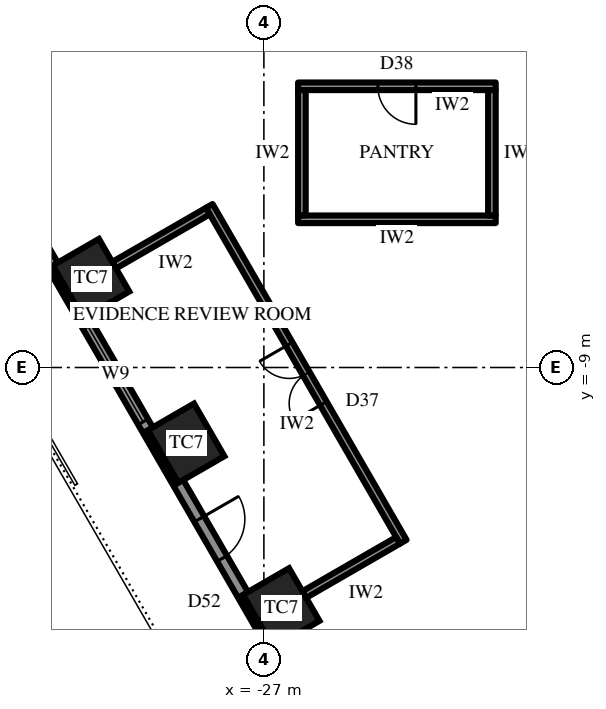
"""IFC4 building model, lengths in metres.
Left out: names, types, materials, properties, quantities, classifications, styles, units other than length and angle.
Written with IfcOpenShell. Run it as: python <this file> out.ifc"""

import sys

from ifc_helpers import new_model, si_unit, direction, frame, frame_2d, origin, origin_2d, place, context, subcontext, project, spatial, rectangle, extrude, element, fill, save


model = new_model("IFC4")
c1 = context("Model", 3, precision=1e-05, world=origin(), true_north=direction((0.0, 1.0)))
c2 = subcontext(c1, "Body", "Model", "MODEL_VIEW")
j1 = project(units=[si_unit("LENGTHUNIT", "METRE"), si_unit("PLANEANGLEUNIT", "RADIAN")], contexts=[c1])
p1 = place(None, origin())
s1 = spatial("IfcSite", under=j1, at=p1, CompositionType="ELEMENT")
p2 = place(p1, origin())
s2 = spatial("IfcBuilding", under=s1, at=p2, CompositionType="ELEMENT")
p3 = place(p2, frame((0.0, 0.0, 165.7)))
s3 = spatial("IfcBuildingStorey", under=s2, at=p3, CompositionType="ELEMENT", Elevation=165.7)
for number, where, z_axis, x_axis in (
    (1, (-31.547, -6.658, 0.0), (0.0, 0.0, 1.0), (0.5, -0.866, 0.0)),
    (2, (-29.045, -10.992, 0.0), (0.0, 0.0, 1.0), (0.5, -0.866, 0.0)),
    (3, (-26.544, -15.325, 0.0), (0.0, 0.0, 1.0), (0.5, -0.866, 0.0)),
):
    element("IfcColumn", number, at=place(p3, frame(where, z_axis=z_axis, x_axis=x_axis)), inside=s3, PredefinedType="COLUMN", context=c2, shape_type="SweptSolid", body=[
        extrude(rectangle(XDim=1.6, YDim=1.4, at=origin_2d()), origin(), (0.0, 0.0, 1.0), 4.2),
    ])
p4 = place(p3, frame((-34.656, -2.675, 0.0), z_axis=(0.0, 0.0, 1.0), x_axis=(0.500003084452, -0.866023622968, 0.0)))
e4 = element("IfcWall", 4, at=p4, inside=s3, PredefinedType="SOLIDWALL", context=c2, shape_type="SweptSolid", body=[
    extrude(rectangle(XDim=30.022, YDim=0.3, at=frame_2d((15.011, 0.0))), origin(), (0.0, 0.0, 1.0), 2.75),
])
p5 = place(p4, frame((1.052, 0.0, 0.6)))
e5 = element("IfcOpeningElement", 5, at=p5, cuts=e4, PredefinedType="OPENING", context=c2, shape_type="SweptSolid", body=[
    extrude(rectangle(XDim=2.9, YDim=1.9, at=frame_2d((1.45, 0.95))), frame((0.0, 0.16, 0.0), z_axis=(0.0, -1.0, 0.0), x_axis=(1.0, 0.0, 0.0)), (0.0, 0.0, 1.0), 0.32),
])
p6 = place(p4, frame((6.056, 0.0, 0.6)))
e6 = element("IfcOpeningElement", 6, at=p6, cuts=e4, PredefinedType="OPENING", context=c2, shape_type="SweptSolid", body=[
    extrude(rectangle(XDim=2.9, YDim=1.9, at=frame_2d((1.45, 0.95))), frame((0.0, 0.16, 0.0), z_axis=(0.0, -1.0, 0.0), x_axis=(1.0, 0.0, 0.0)), (0.0, 0.0, 1.0), 0.32),
])
p7 = place(p4, frame((11.909, 0.0, 0.0)))
e7 = element("IfcOpeningElement", 7, at=p7, cuts=e4, PredefinedType="OPENING", context=c2, shape_type="SweptSolid", body=[
    extrude(rectangle(XDim=1.2, YDim=2.4, at=frame_2d((0.6, 1.2))), frame((0.0, 0.16, 0.0), z_axis=(0.0, -1.0, 0.0), x_axis=(1.0, 0.0, 0.0)), (0.0, 0.0, 1.0), 0.32),
])
p8 = place(p4, frame((16.063, 0.0, 0.6)))
e8 = element("IfcOpeningElement", 8, at=p8, cuts=e4, PredefinedType="OPENING", context=c2, shape_type="SweptSolid", body=[
    extrude(rectangle(XDim=2.9, YDim=1.9, at=frame_2d((1.45, 0.95))), frame((0.0, 0.16, 0.0), z_axis=(0.0, -1.0, 0.0), x_axis=(1.0, 0.0, 0.0)), (0.0, 0.0, 1.0), 0.32),
])
p9 = place(p4, frame((21.067, 0.0, 0.6)))
e9 = element("IfcOpeningElement", 9, at=p9, cuts=e4, PredefinedType="OPENING", context=c2, shape_type="SweptSolid", body=[
    extrude(rectangle(XDim=2.9, YDim=1.9, at=frame_2d((1.45, 0.95))), frame((0.0, 0.16, 0.0), z_axis=(0.0, -1.0, 0.0), x_axis=(1.0, 0.0, 0.0)), (0.0, 0.0, 1.0), 0.32),
])
p10 = place(p4, frame((26.07, 0.0, 0.6)))
e10 = element("IfcOpeningElement", 10, at=p10, cuts=e4, PredefinedType="OPENING", context=c2, shape_type="SweptSolid", body=[
    extrude(rectangle(XDim=2.9, YDim=1.9, at=frame_2d((1.45, 0.95))), frame((0.0, 0.16, 0.0), z_axis=(0.0, -1.0, 0.0), x_axis=(1.0, 0.0, 0.0)), (0.0, 0.0, 1.0), 0.32),
])
p11 = place(p3, frame((-28.436, -4.747, 0.0), z_axis=(0.0, 0.0, 1.0), x_axis=(0.499987468925, -0.866032638483, 0.0)))
e11 = element("IfcWall", 11, at=p11, inside=s3, PredefinedType="PARTITIONING", context=c2, shape_type="SweptSolid", body=[
    extrude(rectangle(XDim=10.207, YDim=0.2, at=frame_2d((5.104, 0.0))), origin(), (0.0, 0.0, 1.0), 4.0),
])
p12 = place(p11, frame((4.204, 0.0, 0.0)))
e12 = element("IfcOpeningElement", 12, at=p12, cuts=e11, PredefinedType="OPENING", context=c2, shape_type="SweptSolid", body=[
    extrude(rectangle(XDim=1.8, YDim=2.4, at=frame_2d((0.9, 1.2))), frame((0.0, 0.11, 0.0), z_axis=(0.0, -1.0, 0.0), x_axis=(1.0, 0.0, 0.0)), (0.0, 0.0, 1.0), 0.22),
])
p13 = place(p3, frame((-28.473, -4.883, 0.0), z_axis=(0.0, 0.0, 1.0), x_axis=(-0.866025820012, -0.499999279071, 0.0)))
e13 = element("IfcWall", 13, at=p13, inside=s3, PredefinedType="PARTITIONING", context=c2, shape_type="SweptSolid", body=[
    extrude(rectangle(XDim=2.85, YDim=0.2, at=frame_2d((1.425, 0.0))), origin(), (0.0, 0.0, 1.0), 3.082),
])
p14 = place(p3, frame((-23.469, -13.55, 0.0), z_axis=(0.0, 0.0, 1.0), x_axis=(-0.866025820012, -0.499999279071, 0.0)))
e14 = element("IfcWall", 14, at=p14, inside=s3, PredefinedType="PARTITIONING", context=c2, shape_type="SweptSolid", body=[
    extrude(rectangle(XDim=2.85, YDim=0.2, at=frame_2d((1.425, 0.0))), origin(), (0.0, 0.0, 1.0), 4.0),
])
p15 = place(p3, frame((-20.9, -1.6, 0.0), z_axis=(0.0, 0.0, 1.0), x_axis=(-1.0, 0.0, 0.0)))
e15 = element("IfcWall", 15, at=p15, inside=s3, PredefinedType="PARTITIONING", context=c2, shape_type="SweptSolid", body=[
    extrude(rectangle(XDim=5.2, YDim=0.2, at=frame_2d((2.6, 0.0))), origin(), (0.0, 0.0, 1.0), 4.0),
])
p16 = place(p15, frame((2.1, 0.0, 0.0)))
e16 = element("IfcOpeningElement", 16, at=p16, cuts=e15, PredefinedType="OPENING", context=c2, shape_type="SweptSolid", body=[
    extrude(rectangle(XDim=1.0, YDim=2.2, at=frame_2d((0.5, 1.1))), frame((0.0, 0.11, 0.0), z_axis=(0.0, -1.0, 0.0), x_axis=(1.0, 0.0, 0.0)), (0.0, 0.0, 1.0), 0.22),
])
p17 = place(p3, frame((-20.9, -5.1, 0.0), z_axis=(0.0, 0.0, 1.0), x_axis=(-1.0, 0.0, 0.0)))
e17 = element("IfcWall", 17, at=p17, inside=s3, PredefinedType="PARTITIONING", context=c2, shape_type="SweptSolid", body=[
    extrude(rectangle(XDim=5.2, YDim=0.2, at=frame_2d((2.6, 0.0))), origin(), (0.0, 0.0, 1.0), 4.0),
])
for number, where, z_axis, x_axis in (
    (18, (-21.0, -1.7, 0.0), (0.0, 0.0, 1.0), (0.0, -1.0, 0.0)),
    (19, (-26.0, -1.7, 0.0), (0.0, 0.0, 1.0), (0.0, -1.0, 0.0)),
):
    element("IfcWall", number, at=place(p3, frame(where, z_axis=z_axis, x_axis=x_axis)), inside=s3, PredefinedType="PARTITIONING", context=c2, shape_type="SweptSolid", body=[
        extrude(rectangle(XDim=3.3, YDim=0.2, at=frame_2d((1.65, 0.0))), origin(), (0.0, 0.0, 1.0), 4.0),
    ])
p18 = place(p6, origin())
e20 = element("IfcWindow", 20, at=p18, inside=s3, PartitioningType="SINGLE_PANEL", PredefinedType="WINDOW", context=c2, shape_type="SweptSolid", body=[
    extrude(rectangle(XDim=2.9, YDim=1.9, at=frame_2d((1.45, 0.95))), frame((0.0, 0.03, 0.0), z_axis=(0.0, -1.0, 0.0), x_axis=(1.0, 0.0, 0.0)), (0.0, 0.0, 1.0), 0.06),
])
fill(e6, e20)
p19 = place(p7, origin())
e21 = element("IfcDoor", 21, at=p19, inside=s3, OperationType="SINGLE_SWING_RIGHT", PredefinedType="DOOR", context=c2, shape_type="SweptSolid", body=[
    extrude(rectangle(XDim=1.2, YDim=2.4, at=frame_2d((0.6, 1.2))), frame((0.0, 0.025, 0.0), z_axis=(0.0, -1.0, 0.0), x_axis=(1.0, 0.0, 0.0)), (0.0, 0.0, 1.0), 0.05),
])
fill(e7, e21)
p20 = place(p12, frame((1.8, 0.0, 0.0), z_axis=(0.0, 0.0, 1.0), x_axis=(-1.0, 0.0, 0.0)))
e22 = element("IfcDoor", 22, at=p20, inside=s3, OperationType="DOUBLE_DOOR_SINGLE_SWING", PredefinedType="DOOR", context=c2, shape_type="SweptSolid", body=[
    extrude(rectangle(XDim=1.8, YDim=2.4, at=frame_2d((0.9, 1.2))), frame((0.0, 0.025, 0.0), z_axis=(0.0, -1.0, 0.0), x_axis=(1.0, 0.0, 0.0)), (0.0, 0.0, 1.0), 0.05),
])
fill(e12, e22)
p21 = place(p16, origin())
e23 = element("IfcDoor", 23, at=p21, inside=s3, OperationType="SINGLE_SWING_RIGHT", PredefinedType="DOOR", context=c2, shape_type="SweptSolid", body=[
    extrude(rectangle(XDim=1.0, YDim=2.2, at=frame_2d((0.5, 1.1))), frame((0.0, 0.025, 0.0), z_axis=(0.0, -1.0, 0.0), x_axis=(1.0, 0.0, 0.0)), (0.0, 0.0, 1.0), 0.05),
])
fill(e16, e23)
save(model, sys.argv[1])
